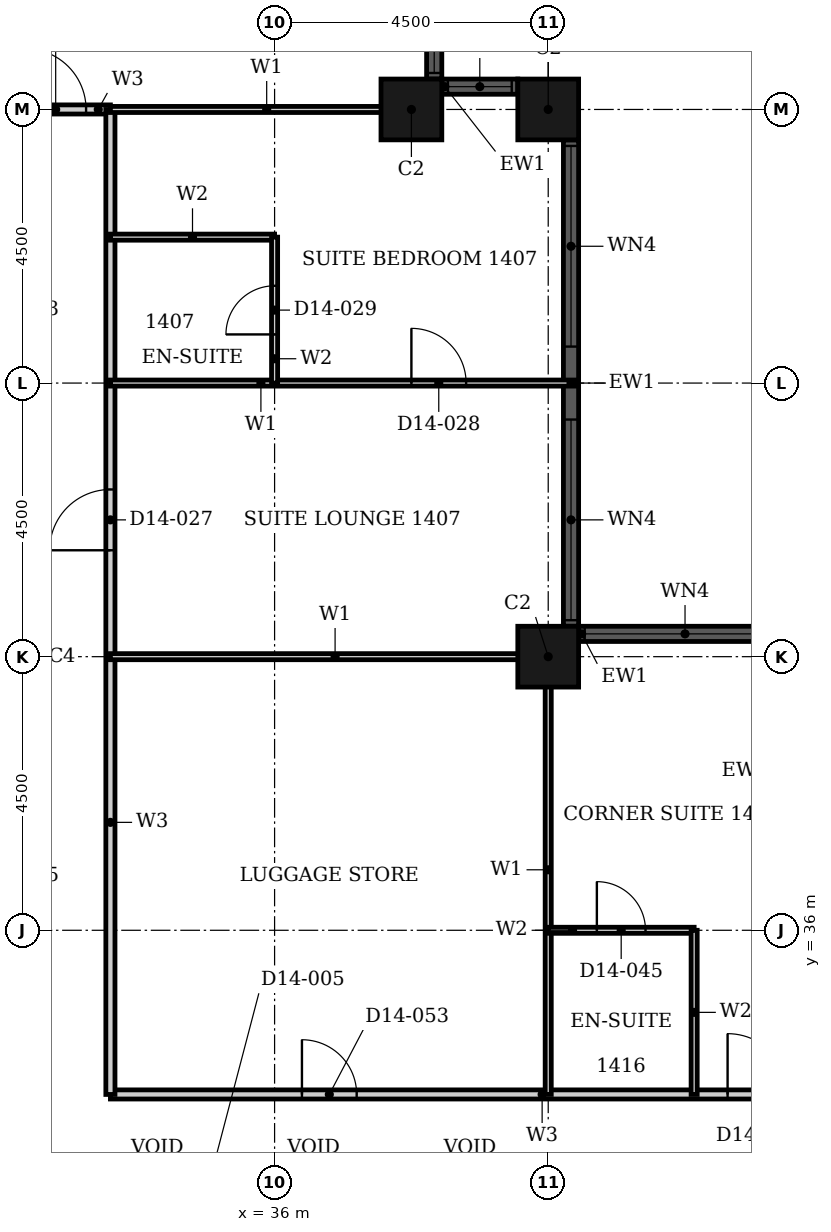
"""IFC4 building model, lengths in metres.
Left out: names, types, materials, properties, quantities, classifications, styles, units other than length and angle.
Written with IfcOpenShell. Run it as: python <this file> out.ifc"""

import sys

from ifc_helpers import new_model, si_unit, direction, frame, frame_2d, origin, origin_2d, place, context, subcontext, project, spatial, rectangle, hollow_rectangle, extrude, element, fill, save


model = new_model("IFC4")
c1 = context("Model", 3, precision=1e-05, world=origin(), true_north=direction((0.0, 1.0)))
c2 = subcontext(c1, "Body", "Model", "MODEL_VIEW")
j1 = project(units=[si_unit("LENGTHUNIT", "METRE"), si_unit("PLANEANGLEUNIT", "RADIAN")], contexts=[c1])
p1 = place(None, origin())
s1 = spatial("IfcSite", under=j1, at=p1, CompositionType="ELEMENT")
p2 = place(p1, origin())
s2 = spatial("IfcBuilding", under=s1, at=p2, CompositionType="ELEMENT")
p3 = place(p2, frame((0.0, 0.0, 63.6)))
s3 = spatial("IfcBuildingStorey", under=s2, at=p3, CompositionType="ELEMENT", Elevation=63.6)
for number, where, z_axis, x_axis in (
    (1, (40.5, 40.5, 0.0), (0.0, 0.0, 1.0), (1.0, 0.0, 0.0)),
    (2, (40.5, 49.5, 0.0), (0.0, 0.0, 1.0), (1.0, 0.0, 0.0)),
    (3, (38.25, 49.5, 0.0), (0.0, 0.0, 1.0), (1.0, 0.0, 0.0)),
):
    element("IfcColumn", number, at=place(p3, frame(where, z_axis=z_axis, x_axis=x_axis)), inside=s3, PredefinedType="COLUMN", context=c2, shape_type="SweptSolid", body=[
        extrude(hollow_rectangle(XDim=1.0, YDim=1.0, WallThickness=0.032, at=origin_2d()), origin(), (0.0, 0.0, 1.0), 3.6),
    ])
p4 = place(p3, frame((44.5, 40.875, 0.0), z_axis=(0.0, 0.0, 1.0), x_axis=(-1.0, 0.0, 0.0)))
e4 = element("IfcWall", 4, at=p4, inside=s3, PredefinedType="SOLIDWALL", context=c2, shape_type="SweptSolid", body=[
    extrude(rectangle(XDim=3.5, YDim=0.25, at=frame_2d((1.75, 0.0))), origin(), (0.0, 0.0, 1.0), 3.6),
])
p5 = place(p4, frame((0.1, 0.0, 0.9)))
e5 = element("IfcOpeningElement", 5, at=p5, cuts=e4, PredefinedType="OPENING", context=c2, shape_type="SweptSolid", body=[
    extrude(rectangle(XDim=3.3, YDim=2.08, at=frame_2d((1.65, 1.04))), frame((0.0, 0.135, 0.0), z_axis=(0.0, -1.0, 0.0), x_axis=(1.0, 0.0, 0.0)), (0.0, 0.0, 1.0), 0.27),
])
p6 = place(p3, frame((40.875, 41.0, 0.0), z_axis=(0.0, 0.0, 1.0), x_axis=(0.0, 1.0, 0.0)))
e6 = element("IfcWall", 6, at=p6, inside=s3, PredefinedType="SOLIDWALL", context=c2, shape_type="SweptSolid", body=[
    extrude(rectangle(XDim=8.0, YDim=0.25, at=frame_2d((4.0, 0.0))), origin(), (0.0, 0.0, 1.0), 3.6),
])
p7 = place(p6, frame((0.1, 0.0, 0.9)))
e7 = element("IfcOpeningElement", 7, at=p7, cuts=e6, PredefinedType="OPENING", context=c2, shape_type="SweptSolid", body=[
    extrude(rectangle(XDim=3.3, YDim=2.08, at=frame_2d((1.65, 1.04))), frame((0.0, 0.135, 0.0), z_axis=(0.0, -1.0, 0.0), x_axis=(1.0, 0.0, 0.0)), (0.0, 0.0, 1.0), 0.27),
])
p8 = place(p6, frame((4.6, 0.0, 0.9)))
e8 = element("IfcOpeningElement", 8, at=p8, cuts=e6, PredefinedType="OPENING", context=c2, shape_type="SweptSolid", body=[
    extrude(rectangle(XDim=3.3, YDim=2.08, at=frame_2d((1.65, 1.04))), frame((0.0, 0.135, 0.0), z_axis=(0.0, -1.0, 0.0), x_axis=(1.0, 0.0, 0.0)), (0.0, 0.0, 1.0), 0.27),
])
p9 = place(p3, frame((40.0, 49.875, 0.0), z_axis=(0.0, 0.0, 1.0), x_axis=(-1.0, 0.0, 0.0)))
e9 = element("IfcWall", 9, at=p9, inside=s3, PredefinedType="SOLIDWALL", context=c2, shape_type="SweptSolid", body=[
    extrude(rectangle(XDim=1.25, YDim=0.25, at=frame_2d((0.625, 0.0))), origin(), (0.0, 0.0, 1.0), 3.6),
])
p10 = place(p9, frame((0.1, 0.0, 0.9)))
e10 = element("IfcOpeningElement", 10, at=p10, cuts=e9, PredefinedType="OPENING", context=c2, shape_type="SweptSolid", body=[
    extrude(rectangle(XDim=1.05, YDim=2.08, at=frame_2d((0.525, 1.04))), frame((0.0, 0.135, 0.0), z_axis=(0.0, -1.0, 0.0), x_axis=(1.0, 0.0, 0.0)), (0.0, 0.0, 1.0), 0.27),
])
p11 = place(p3, frame((38.625, 50.0, 0.0), z_axis=(0.0, 0.0, 1.0), x_axis=(0.0, 1.0, 0.0)))
e11 = element("IfcWall", 11, at=p11, inside=s3, PredefinedType="SOLIDWALL", context=c2, shape_type="SweptSolid", body=[
    extrude(rectangle(XDim=1.25, YDim=0.25, at=frame_2d((0.625, 0.0))), origin(), (0.0, 0.0, 1.0), 3.6),
])
p12 = place(p11, frame((0.1, 0.0, 0.9)))
e12 = element("IfcOpeningElement", 12, at=p12, cuts=e11, PredefinedType="OPENING", context=c2, shape_type="SweptSolid", body=[
    extrude(rectangle(XDim=1.05, YDim=2.08, at=frame_2d((0.525, 1.04))), frame((0.0, 0.135, 0.0), z_axis=(0.0, -1.0, 0.0), x_axis=(1.0, 0.0, 0.0)), (0.0, 0.0, 1.0), 0.27),
])
p13 = place(p3, frame((33.3, 33.3, 0.0), z_axis=(0.0, 0.0, 1.0), x_axis=(1.0, 0.0, 0.0)))
e13 = element("IfcWall", 13, at=p13, inside=s3, PredefinedType="PARTITIONING", context=c2, shape_type="SweptSolid", body=[
    extrude(rectangle(XDim=13.5, YDim=0.15, at=frame_2d((6.75, 0.0))), origin(), (0.0, 0.0, 1.0), 3.3),
])
p14 = place(p13, frame((10.15, 0.0, 0.0)))
e14 = element("IfcOpeningElement", 14, at=p14, cuts=e13, PredefinedType="OPENING", context=c2, shape_type="SweptSolid", body=[
    extrude(rectangle(XDim=1.0, YDim=2.1, at=frame_2d((0.5, 1.05))), frame((0.0, 0.085, 0.0), z_axis=(0.0, -1.0, 0.0), x_axis=(1.0, 0.0, 0.0)), (0.0, 0.0, 1.0), 0.17),
])
p15 = place(p13, frame((3.15, 0.0, 0.0)))
e15 = element("IfcOpeningElement", 15, at=p15, cuts=e13, PredefinedType="OPENING", context=c2, shape_type="SweptSolid", body=[
    extrude(rectangle(XDim=0.9, YDim=2.1, at=frame_2d((0.45, 1.05))), frame((0.0, 0.085, 0.0), z_axis=(0.0, -1.0, 0.0), x_axis=(1.0, 0.0, 0.0)), (0.0, 0.0, 1.0), 0.17),
])
p16 = place(p3, frame((31.5, 49.5, 0.0), z_axis=(0.0, 0.0, 1.0), x_axis=(1.0, 0.0, 0.0)))
e16 = element("IfcWall", 16, at=p16, inside=s3, PredefinedType="PARTITIONING", context=c2, shape_type="SweptSolid", body=[
    extrude(rectangle(XDim=1.8, YDim=0.15, at=frame_2d((0.9, 0.0))), origin(), (0.0, 0.0, 1.0), 3.3),
])
p17 = place(p16, frame((0.4, 0.0, 0.0)))
e17 = element("IfcOpeningElement", 17, at=p17, cuts=e16, PredefinedType="OPENING", context=c2, shape_type="SweptSolid", body=[
    extrude(rectangle(XDim=1.0, YDim=2.1, at=frame_2d((0.5, 1.05))), frame((0.0, 0.085, 0.0), z_axis=(0.0, -1.0, 0.0), x_axis=(1.0, 0.0, 0.0)), (0.0, 0.0, 1.0), 0.17),
])
p18 = place(p3, frame((33.3, 33.3, 0.0), z_axis=(0.0, 0.0, 1.0), x_axis=(0.0, 1.0, 0.0)))
e18 = element("IfcWall", 18, at=p18, inside=s3, PredefinedType="PARTITIONING", context=c2, shape_type="SweptSolid", body=[
    extrude(rectangle(XDim=16.2, YDim=0.15, at=frame_2d((8.1, 0.0))), origin(), (0.0, 0.0, 1.0), 3.3),
])
p19 = place(p18, frame((8.95, 0.0, 0.0)))
e19 = element("IfcOpeningElement", 19, at=p19, cuts=e18, PredefinedType="OPENING", context=c2, shape_type="SweptSolid", body=[
    extrude(rectangle(XDim=1.0, YDim=2.1, at=frame_2d((0.5, 1.05))), frame((0.0, 0.085, 0.0), z_axis=(0.0, -1.0, 0.0), x_axis=(1.0, 0.0, 0.0)), (0.0, 0.0, 1.0), 0.17),
])
p20 = place(p3, frame((33.3, 40.5, 0.0), z_axis=(0.0, 0.0, 1.0), x_axis=(1.0, 0.0, 0.0)))
e20 = element("IfcWall", 20, at=p20, inside=s3, PredefinedType="PARTITIONING", context=c2, shape_type="SweptSolid", body=[
    extrude(rectangle(XDim=7.39, YDim=0.1, at=frame_2d((3.695, 0.0))), origin(), (0.0, 0.0, 1.0), 2.38),
])
p21 = place(p3, frame((33.3, 45.0, 0.0), z_axis=(0.0, 0.0, 1.0), x_axis=(1.0, 0.0, 0.0)))
e21 = element("IfcWall", 21, at=p21, inside=s3, PredefinedType="PARTITIONING", context=c2, shape_type="SweptSolid", body=[
    extrude(rectangle(XDim=7.64, YDim=0.1, at=frame_2d((3.82, 0.0))), origin(), (0.0, 0.0, 1.0), 3.3),
])
p22 = place(p21, frame((4.95, 0.0, 0.0)))
e22 = element("IfcOpeningElement", 22, at=p22, cuts=e21, PredefinedType="OPENING", context=c2, shape_type="SweptSolid", body=[
    extrude(rectangle(XDim=0.9, YDim=2.1, at=frame_2d((0.45, 1.05))), frame((0.0, 0.06, 0.0), z_axis=(0.0, -1.0, 0.0), x_axis=(1.0, 0.0, 0.0)), (0.0, 0.0, 1.0), 0.12),
])
p23 = place(p3, frame((33.3, 49.5, 0.0), z_axis=(0.0, 0.0, 1.0), x_axis=(1.0, 0.0, 0.0)))
e23 = element("IfcWall", 23, at=p23, inside=s3, PredefinedType="PARTITIONING", context=c2, shape_type="SweptSolid", body=[
    extrude(rectangle(XDim=5.14, YDim=0.1, at=frame_2d((2.57, 0.0))), origin(), (0.0, 0.0, 1.0), 3.3),
])
p24 = place(p3, frame((40.5, 33.3, 0.0), z_axis=(0.0, 0.0, 1.0), x_axis=(0.0, 1.0, 0.0)))
e24 = element("IfcWall", 24, at=p24, inside=s3, PredefinedType="PARTITIONING", context=c2, shape_type="SweptSolid", body=[
    extrude(rectangle(XDim=7.39, YDim=0.1, at=frame_2d((3.695, 0.0))), origin(), (0.0, 0.0, 1.0), 3.3),
])
p25 = place(p3, frame((40.5, 36.0, 0.0), z_axis=(0.0, 0.0, 1.0), x_axis=(1.0, 0.0, 0.0)))
e25 = element("IfcWall", 25, at=p25, inside=s3, PredefinedType="PARTITIONING", context=c2, shape_type="SweptSolid", body=[
    extrude(rectangle(XDim=2.4, YDim=0.1, at=frame_2d((1.2, 0.0))), origin(), (0.0, 0.0, 1.0), 3.3),
])
p26 = place(p25, frame((0.8, 0.0, 0.0)))
e26 = element("IfcOpeningElement", 26, at=p26, cuts=e25, PredefinedType="OPENING", context=c2, shape_type="SweptSolid", body=[
    extrude(rectangle(XDim=0.8, YDim=2.1, at=frame_2d((0.4, 1.05))), frame((0.0, 0.06, 0.0), z_axis=(0.0, -1.0, 0.0), x_axis=(1.0, 0.0, 0.0)), (0.0, 0.0, 1.0), 0.12),
])
p27 = place(p3, frame((33.3, 47.4, 0.0), z_axis=(0.0, 0.0, 1.0), x_axis=(1.0, 0.0, 0.0)))
e27 = element("IfcWall", 27, at=p27, inside=s3, PredefinedType="PARTITIONING", context=c2, shape_type="SweptSolid", body=[
    extrude(rectangle(XDim=2.7, YDim=0.1, at=frame_2d((1.35, 0.0))), origin(), (0.0, 0.0, 1.0), 3.3),
])
p28 = place(p3, frame((36.0, 45.0, 0.0), z_axis=(0.0, 0.0, 1.0), x_axis=(0.0, 1.0, 0.0)))
e28 = element("IfcWall", 28, at=p28, inside=s3, PredefinedType="PARTITIONING", context=c2, shape_type="SweptSolid", body=[
    extrude(rectangle(XDim=2.4, YDim=0.1, at=frame_2d((1.2, 0.0))), origin(), (0.0, 0.0, 1.0), 2.58),
])
p29 = place(p28, frame((0.8, 0.0, 0.0)))
e29 = element("IfcOpeningElement", 29, at=p29, cuts=e28, PredefinedType="OPENING", context=c2, shape_type="SweptSolid", body=[
    extrude(rectangle(XDim=0.8, YDim=2.1, at=frame_2d((0.4, 1.05))), frame((0.0, 0.06, 0.0), z_axis=(0.0, -1.0, 0.0), x_axis=(1.0, 0.0, 0.0)), (0.0, 0.0, 1.0), 0.12),
])
p30 = place(p3, frame((42.9, 33.3, 0.0), z_axis=(0.0, 0.0, 1.0), x_axis=(0.0, 1.0, 0.0)))
e30 = element("IfcWall", 30, at=p30, inside=s3, PredefinedType="PARTITIONING", context=c2, shape_type="SweptSolid", body=[
    extrude(rectangle(XDim=2.7, YDim=0.1, at=frame_2d((1.35, 0.0))), origin(), (0.0, 0.0, 1.0), 3.3),
])
p31 = place(p5, origin())
e31 = element("IfcWindow", 31, at=p31, inside=s3, PartitioningType="SINGLE_PANEL", PredefinedType="WINDOW", context=c2, shape_type="SweptSolid", body=[
    extrude(rectangle(XDim=3.3, YDim=2.08, at=frame_2d((1.65, 1.04))), frame((0.0, 0.03, 0.0), z_axis=(0.0, -1.0, 0.0), x_axis=(1.0, 0.0, 0.0)), (0.0, 0.0, 1.0), 0.06),
])
fill(e5, e31)
p32 = place(p7, origin())
e32 = element("IfcWindow", 32, at=p32, inside=s3, PartitioningType="SINGLE_PANEL", PredefinedType="WINDOW", context=c2, shape_type="SweptSolid", body=[
    extrude(rectangle(XDim=3.3, YDim=2.08, at=frame_2d((1.65, 1.04))), frame((0.0, 0.03, 0.0), z_axis=(0.0, -1.0, 0.0), x_axis=(1.0, 0.0, 0.0)), (0.0, 0.0, 1.0), 0.06),
])
fill(e7, e32)
p33 = place(p8, origin())
e33 = element("IfcWindow", 33, at=p33, inside=s3, PartitioningType="SINGLE_PANEL", PredefinedType="WINDOW", context=c2, shape_type="SweptSolid", body=[
    extrude(rectangle(XDim=3.3, YDim=2.08, at=frame_2d((1.65, 1.04))), frame((0.0, 0.03, 0.0), z_axis=(0.0, -1.0, 0.0), x_axis=(1.0, 0.0, 0.0)), (0.0, 0.0, 1.0), 0.06),
])
fill(e8, e33)
p34 = place(p10, origin())
e34 = element("IfcWindow", 34, at=p34, inside=s3, PartitioningType="SINGLE_PANEL", PredefinedType="WINDOW", context=c2, shape_type="SweptSolid", body=[
    extrude(rectangle(XDim=1.05, YDim=2.08, at=frame_2d((0.525, 1.04))), frame((0.0, 0.03, 0.0), z_axis=(0.0, -1.0, 0.0), x_axis=(1.0, 0.0, 0.0)), (0.0, 0.0, 1.0), 0.06),
])
fill(e10, e34)
p35 = place(p12, origin())
e35 = element("IfcWindow", 35, at=p35, inside=s3, PartitioningType="SINGLE_PANEL", PredefinedType="WINDOW", context=c2, shape_type="SweptSolid", body=[
    extrude(rectangle(XDim=1.05, YDim=2.08, at=frame_2d((0.525, 1.04))), frame((0.0, 0.03, 0.0), z_axis=(0.0, -1.0, 0.0), x_axis=(1.0, 0.0, 0.0)), (0.0, 0.0, 1.0), 0.06),
])
fill(e12, e35)
p36 = place(p19, origin())
e36 = element("IfcDoor", 36, at=p36, inside=s3, OperationType="SINGLE_SWING_RIGHT", PredefinedType="DOOR", context=c2, shape_type="SweptSolid", body=[
    extrude(rectangle(XDim=1.0, YDim=2.1, at=frame_2d((0.5, 1.05))), frame((0.0, 0.025, 0.0), z_axis=(0.0, -1.0, 0.0), x_axis=(1.0, 0.0, 0.0)), (0.0, 0.0, 1.0), 0.05),
])
fill(e19, e36)
p37 = place(p22, origin())
e37 = element("IfcDoor", 37, at=p37, inside=s3, OperationType="SINGLE_SWING_RIGHT", PredefinedType="DOOR", context=c2, shape_type="SweptSolid", body=[
    extrude(rectangle(XDim=0.9, YDim=2.1, at=frame_2d((0.45, 1.05))), frame((0.0, 0.025, 0.0), z_axis=(0.0, -1.0, 0.0), x_axis=(1.0, 0.0, 0.0)), (0.0, 0.0, 1.0), 0.05),
])
fill(e22, e37)
p38 = place(p29, origin())
e38 = element("IfcDoor", 38, at=p38, inside=s3, OperationType="SINGLE_SWING_LEFT", PredefinedType="DOOR", context=c2, shape_type="SweptSolid", body=[
    extrude(rectangle(XDim=0.8, YDim=2.1, at=frame_2d((0.4, 1.05))), frame((0.0, 0.025, 0.0), z_axis=(0.0, -1.0, 0.0), x_axis=(1.0, 0.0, 0.0)), (0.0, 0.0, 1.0), 0.05),
])
fill(e29, e38)
p39 = place(p17, origin())
e39 = element("IfcDoor", 39, at=p39, inside=s3, OperationType="SINGLE_SWING_LEFT", PredefinedType="DOOR", context=c2, shape_type="SweptSolid", body=[
    extrude(rectangle(XDim=1.0, YDim=2.1, at=frame_2d((0.5, 1.05))), frame((0.0, 0.025, 0.0), z_axis=(0.0, -1.0, 0.0), x_axis=(1.0, 0.0, 0.0)), (0.0, 0.0, 1.0), 0.05),
])
fill(e17, e39)
p40 = place(p14, origin())
e40 = element("IfcDoor", 40, at=p40, inside=s3, OperationType="SINGLE_SWING_RIGHT", PredefinedType="DOOR", context=c2, shape_type="SweptSolid", body=[
    extrude(rectangle(XDim=1.0, YDim=2.1, at=frame_2d((0.5, 1.05))), frame((0.0, 0.025, 0.0), z_axis=(0.0, -1.0, 0.0), x_axis=(1.0, 0.0, 0.0)), (0.0, 0.0, 1.0), 0.05),
])
fill(e14, e40)
p41 = place(p26, origin())
e41 = element("IfcDoor", 41, at=p41, inside=s3, OperationType="SINGLE_SWING_LEFT", PredefinedType="DOOR", context=c2, shape_type="SweptSolid", body=[
    extrude(rectangle(XDim=0.8, YDim=2.1, at=frame_2d((0.4, 1.05))), frame((0.0, 0.025, 0.0), z_axis=(0.0, -1.0, 0.0), x_axis=(1.0, 0.0, 0.0)), (0.0, 0.0, 1.0), 0.05),
])
fill(e26, e41)
p42 = place(p15, origin())
e42 = element("IfcDoor", 42, at=p42, inside=s3, OperationType="SINGLE_SWING_LEFT", PredefinedType="DOOR", context=c2, shape_type="SweptSolid", body=[
    extrude(rectangle(XDim=0.9, YDim=2.1, at=frame_2d((0.45, 1.05))), frame((0.0, 0.025, 0.0), z_axis=(0.0, -1.0, 0.0), x_axis=(1.0, 0.0, 0.0)), (0.0, 0.0, 1.0), 0.05),
])
fill(e15, e42)
save(model, sys.argv[1])
